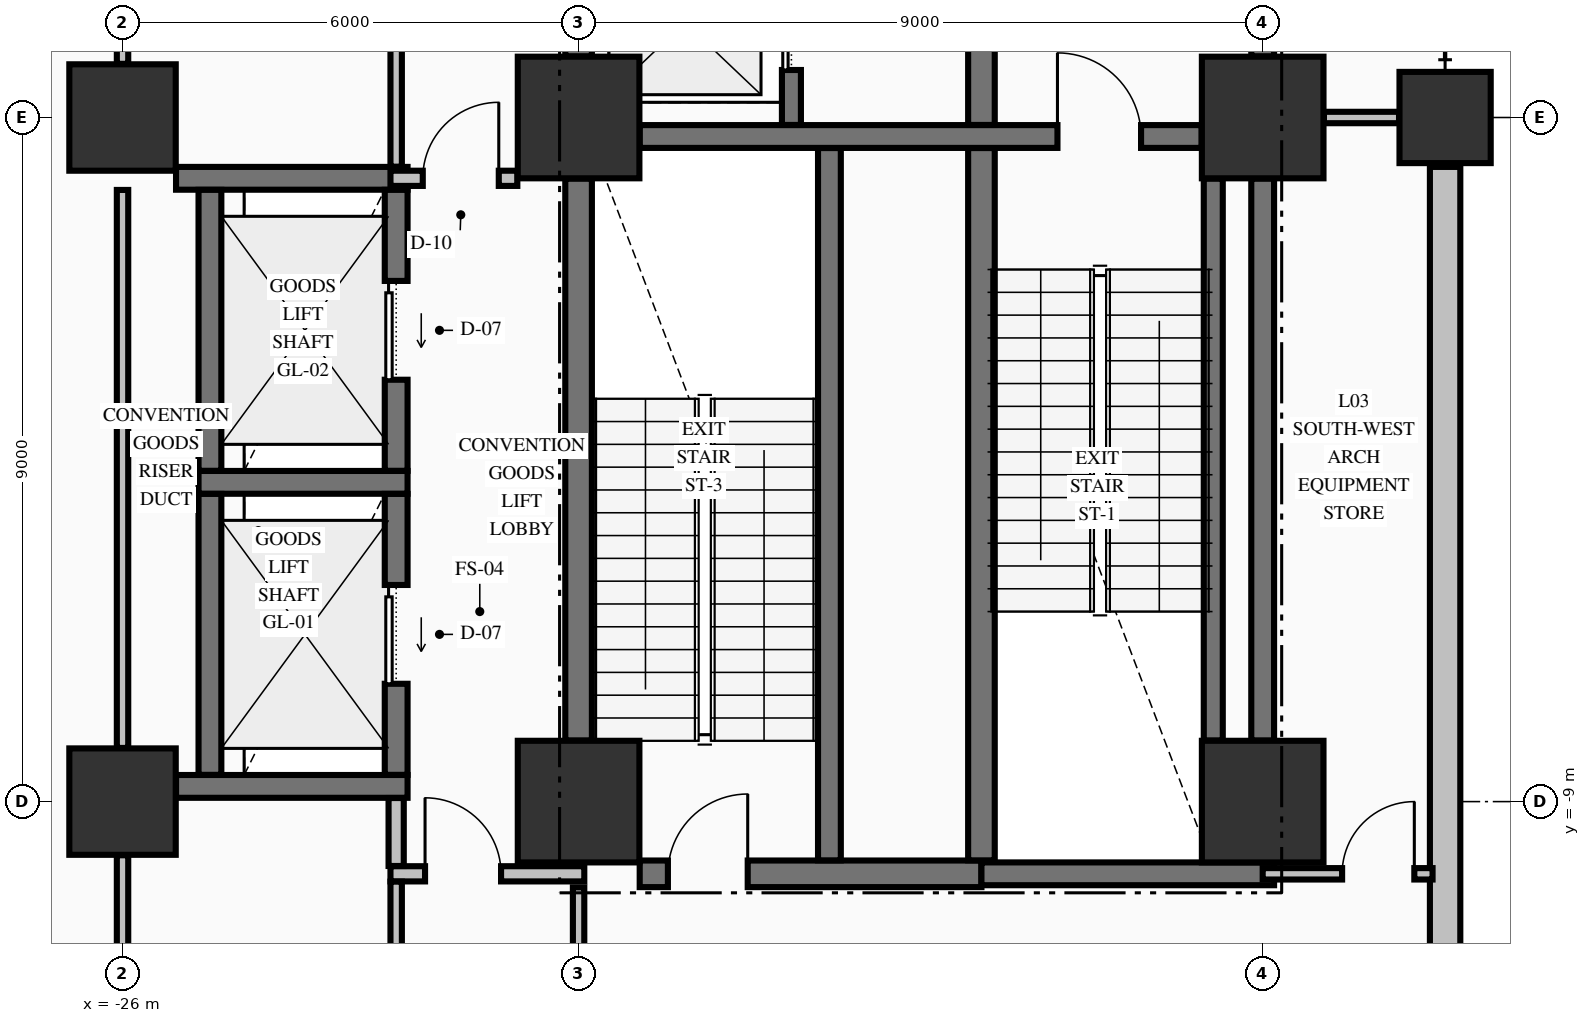
"""IFC4 building model, lengths in metres.
Left out: names, types, materials, properties, quantities, classifications, styles, units other than length and angle.
Written with IfcOpenShell. Run it as: python <this file> out.ifc"""

import sys

from ifc_helpers import new_model, si_unit, direction, frame, frame_2d, origin, origin_2d, place, context, subcontext, project, spatial, rectangle, extrude, element, fill, save


model = new_model("IFC4")
c1 = context("Model", 3, precision=1e-05, world=origin(), true_north=direction((0.0, 1.0)))
c2 = subcontext(c1, "Body", "Model", "MODEL_VIEW")
j1 = project(units=[si_unit("LENGTHUNIT", "METRE"), si_unit("PLANEANGLEUNIT", "RADIAN")], contexts=[c1])
p1 = place(None, origin())
s1 = spatial("IfcSite", under=j1, at=p1, CompositionType="ELEMENT")
p2 = place(p1, origin())
s2 = spatial("IfcBuilding", under=s1, at=p2, CompositionType="ELEMENT")
p3 = place(p2, frame((0.0, 0.0, 16.32)))
s3 = spatial("IfcBuildingStorey", under=s2, at=p3, CompositionType="ELEMENT", Elevation=16.32)
for number, where, z_axis, x_axis in (
    (1, (-26.0, -9.0, 0.0), (0.0, 0.0, 1.0), (1.0, 0.0, 0.0)),
    (2, (-26.0, 0.0, 0.0), (0.0, 0.0, 1.0), (1.0, 0.0, 0.0)),
):
    element("IfcColumn", number, at=place(p3, frame(where, z_axis=z_axis, x_axis=x_axis)), inside=s3, PredefinedType="COLUMN", context=c2, shape_type="SweptSolid", body=[
        extrude(rectangle(XDim=1.4, YDim=1.4, at=origin_2d()), origin(), (0.0, 0.0, 1.0), 4.99),
    ])
for number, where, z_axis, x_axis in (
    (3, (-20.0, -9.0, 0.0), (0.0, 0.0, 1.0), (1.0, 0.0, 0.0)),
    (4, (-20.0, 0.0, 0.0), (0.0, 0.0, 1.0), (1.0, 0.0, 0.0)),
    (5, (-11.0, -9.0, 0.0), (0.0, 0.0, 1.0), (1.0, 0.0, 0.0)),
    (6, (-11.0, 0.0, 0.0), (0.0, 0.0, 1.0), (1.0, 0.0, 0.0)),
):
    element("IfcColumn", number, at=place(p3, frame(where, z_axis=z_axis, x_axis=x_axis)), inside=s3, PredefinedType="COLUMN", context=c2, shape_type="SweptSolid", body=[
        extrude(rectangle(XDim=1.6, YDim=1.6, at=origin_2d()), origin(), (0.0, 0.0, 1.0), 4.99),
    ])
p4 = place(p3, frame((-8.6, 0.0, 0.0), z_axis=(0.0, 0.0, 1.0), x_axis=(1.0, 0.0, 0.0)))
e7 = element("IfcColumn", 7, at=p4, inside=s3, PredefinedType="COLUMN", context=c2, shape_type="SweptSolid", body=[
    extrude(rectangle(XDim=1.2, YDim=1.2, at=origin_2d()), origin(), (0.0, 0.0, 1.0), 4.99),
])
p5 = place(p3, frame((-8.6, -25.37, 0.0), z_axis=(0.0, 0.0, 1.0), x_axis=(0.0, 1.0, 0.0)))
e8 = element("IfcWall", 8, at=p5, inside=s3, PredefinedType="STANDARD", context=c2, shape_type="SweptSolid", body=[
    extrude(rectangle(XDim=24.72, YDim=0.4, at=frame_2d((12.36, 0.0))), origin(), (0.0, 0.0, 1.0), 2.582),
])
p6 = place(p3, frame((-19.196, -9.95, 0.0), z_axis=(0.0, 0.0, 1.0), x_axis=(1.0, 0.0, 0.0)))
e9 = element("IfcWall", 9, at=p6, inside=s3, PredefinedType="SHEAR", context=c2, shape_type="SweptSolid", body=[
    extrude(rectangle(XDim=4.496, YDim=0.35, at=frame_2d((2.248, 0.0))), origin(), (0.0, 0.0, 1.0), 4.99),
])
p7 = place(p6, frame((0.371, 0.0, 0.0)))
e10 = element("IfcOpeningElement", 10, at=p7, cuts=e9, PredefinedType="OPENING", context=c2, shape_type="SweptSolid", body=[
    extrude(rectangle(XDim=1.05, YDim=2.15, at=frame_2d((0.525, 1.075))), frame((0.0, 0.185, 0.0), z_axis=(0.0, -1.0, 0.0), x_axis=(1.0, 0.0, 0.0)), (0.0, 0.0, 1.0), 0.37),
])
p8 = place(p3, frame((-14.7, -9.95, 0.0), z_axis=(0.0, 0.0, 1.0), x_axis=(1.0, 0.0, 0.0)))
e11 = element("IfcWall", 11, at=p8, inside=s3, PredefinedType="SHEAR", context=c2, shape_type="SweptSolid", body=[
    extrude(rectangle(XDim=3.85, YDim=0.3, at=frame_2d((1.925, 0.0))), origin(), (0.0, 0.0, 1.0), 4.99),
])
p9 = place(p3, frame((-25.296, -8.8, 0.0), z_axis=(0.0, 0.0, 1.0), x_axis=(1.0, 0.0, 0.0)))
e12 = element("IfcWall", 12, at=p9, inside=s3, PredefinedType="SHEAR", context=c2, shape_type="SweptSolid", body=[
    extrude(rectangle(XDim=3.046, YDim=0.3, at=frame_2d((1.523, 0.0))), origin(), (0.0, 0.0, 1.0), 4.99),
])
p10 = place(p3, frame((-25.0, -4.8, 0.0), z_axis=(0.0, 0.0, 1.0), x_axis=(1.0, 0.0, 0.0)))
e13 = element("IfcWall", 13, at=p10, inside=s3, PredefinedType="SHEAR", context=c2, shape_type="SweptSolid", body=[
    extrude(rectangle(XDim=2.75, YDim=0.3, at=frame_2d((1.375, 0.0))), origin(), (0.0, 0.0, 1.0), 4.99),
])
p11 = place(p3, frame((-25.296, -0.8, 0.0), z_axis=(0.0, 0.0, 1.0), x_axis=(1.0, 0.0, 0.0)))
e14 = element("IfcWall", 14, at=p11, inside=s3, PredefinedType="SHEAR", context=c2, shape_type="SweptSolid", body=[
    extrude(rectangle(XDim=3.046, YDim=0.3, at=frame_2d((1.523, 0.0))), origin(), (0.0, 0.0, 1.0), 4.99),
])
p12 = place(p3, frame((-19.196, -0.25, 0.0), z_axis=(0.0, 0.0, 1.0), x_axis=(1.0, 0.0, 0.0)))
e15 = element("IfcWall", 15, at=p12, inside=s3, PredefinedType="SHEAR", context=c2, shape_type="SweptSolid", body=[
    extrude(rectangle(XDim=7.392, YDim=0.3, at=frame_2d((3.696, 0.0))), origin(), (0.0, 0.0, 1.0), 4.99),
])
p13 = place(p12, frame((5.496, 0.0, 0.0)))
e16 = element("IfcOpeningElement", 16, at=p13, cuts=e15, PredefinedType="OPENING", context=c2, shape_type="SweptSolid", body=[
    extrude(rectangle(XDim=1.1, YDim=2.15, at=frame_2d((0.55, 1.075))), frame((0.0, 0.16, 0.0), z_axis=(0.0, -1.0, 0.0), x_axis=(1.0, 0.0, 0.0)), (0.0, 0.0, 1.0), 0.32),
])
p14 = place(p3, frame((-22.475, -9.95, 0.0), z_axis=(0.0, 0.0, 1.0), x_axis=(1.0, 0.0, 0.0)))
e17 = element("IfcWall", 17, at=p14, inside=s3, PredefinedType="PARTITIONING", context=c2, shape_type="SweptSolid", body=[
    extrude(rectangle(XDim=2.55, YDim=0.2, at=frame_2d((1.275, 0.0))), origin(), (0.0, 0.0, 1.0), 4.99),
])
p15 = place(p14, frame((0.455, 0.0, 0.0)))
e18 = element("IfcOpeningElement", 18, at=p15, cuts=e17, PredefinedType="OPENING", context=c2, shape_type="SweptSolid", body=[
    extrude(rectangle(XDim=1.0, YDim=2.15, at=frame_2d((0.5, 1.075))), frame((0.0, 0.11, 0.0), z_axis=(0.0, -1.0, 0.0), x_axis=(1.0, 0.0, 0.0)), (0.0, 0.0, 1.0), 0.22),
])
p16 = place(p3, frame((-11.0, -9.95, 0.0), z_axis=(0.0, 0.0, 1.0), x_axis=(1.0, 0.0, 0.0)))
e19 = element("IfcWall", 19, at=p16, inside=s3, PredefinedType="PARTITIONING", context=c2, shape_type="SweptSolid", body=[
    extrude(rectangle(XDim=2.235, YDim=0.15, at=frame_2d((1.118, 0.0))), origin(), (0.0, 0.0, 1.0), 4.99),
])
p17 = place(p16, frame((1.045, 0.0, 0.0)))
e20 = element("IfcOpeningElement", 20, at=p17, cuts=e19, PredefinedType="OPENING", context=c2, shape_type="SweptSolid", body=[
    extrude(rectangle(XDim=0.95, YDim=2.15, at=frame_2d((0.475, 1.075))), frame((0.0, 0.085, 0.0), z_axis=(0.0, -1.0, 0.0), x_axis=(1.0, 0.0, 0.0)), (0.0, 0.0, 1.0), 0.17),
])
p18 = place(p3, frame((-22.475, -0.8, 0.0), z_axis=(0.0, 0.0, 1.0), x_axis=(1.0, 0.0, 0.0)))
e21 = element("IfcWall", 21, at=p18, inside=s3, PredefinedType="PARTITIONING", context=c2, shape_type="SweptSolid", body=[
    extrude(rectangle(XDim=1.669, YDim=0.2, at=frame_2d((0.834, 0.0))), origin(), (0.0, 0.0, 1.0), 4.99),
])
p19 = place(p18, frame((0.425, 0.0, 0.0)))
e22 = element("IfcOpeningElement", 22, at=p19, cuts=e21, PredefinedType="OPENING", context=c2, shape_type="SweptSolid", body=[
    extrude(rectangle(XDim=1.0, YDim=2.15, at=frame_2d((0.5, 1.075))), frame((0.0, 0.11, 0.0), z_axis=(0.0, -1.0, 0.0), x_axis=(1.0, 0.0, 0.0)), (0.0, 0.0, 1.0), 0.22),
])
p20 = place(p3, frame((-10.194, 0.0, 0.0), z_axis=(0.0, 0.0, 1.0), x_axis=(1.0, 0.0, 0.0)))
e23 = element("IfcWall", 23, at=p20, inside=s3, PredefinedType="PARTITIONING", context=c2, shape_type="SweptSolid", body=[
    extrude(rectangle(XDim=0.988, YDim=0.15, at=frame_2d((0.494, 0.0))), origin(), (0.0, 0.0, 1.0), 3.332),
])
for number, where, z_axis, x_axis in (
    (24, (-24.85, -8.648, 0.0), (0.0, 0.0, 1.0), (0.0, 1.0, 0.0)),
    (25, (-24.85, -4.648, 0.0), (0.0, 0.0, 1.0), (0.0, 1.0, 0.0)),
):
    element("IfcWall", number, at=place(p3, frame(where, z_axis=z_axis, x_axis=x_axis)), inside=s3, PredefinedType="SHEAR", context=c2, shape_type="SweptSolid", body=[
        extrude(rectangle(XDim=3.696, YDim=0.3, at=frame_2d((1.848, 0.0))), origin(), (0.0, 0.0, 1.0), 4.99),
    ])
p21 = place(p3, frame((-22.4, -8.648, 0.0), z_axis=(0.0, 0.0, 1.0), x_axis=(0.0, 1.0, 0.0)))
e26 = element("IfcWall", 26, at=p21, inside=s3, PredefinedType="SHEAR", context=c2, shape_type="SweptSolid", body=[
    extrude(rectangle(XDim=3.696, YDim=0.3, at=frame_2d((1.848, 0.0))), origin(), (0.0, 0.0, 1.0), 4.99),
])
p22 = place(p21, frame((1.198, 0.0, 0.0)))
e27 = element("IfcOpeningElement", 27, at=p22, cuts=e26, PredefinedType="OPENING", context=c2, shape_type="SweptSolid", body=[
    extrude(rectangle(XDim=1.3, YDim=2.3, at=frame_2d((0.65, 1.15))), frame((0.0, 0.16, 0.0), z_axis=(0.0, -1.0, 0.0), x_axis=(1.0, 0.0, 0.0)), (0.0, 0.0, 1.0), 0.32),
])
p23 = place(p3, frame((-22.4, -4.648, 0.0), z_axis=(0.0, 0.0, 1.0), x_axis=(0.0, 1.0, 0.0)))
e28 = element("IfcWall", 28, at=p23, inside=s3, PredefinedType="SHEAR", context=c2, shape_type="SweptSolid", body=[
    extrude(rectangle(XDim=3.696, YDim=0.3, at=frame_2d((1.848, 0.0))), origin(), (0.0, 0.0, 1.0), 4.99),
])
p24 = place(p23, frame((1.198, 0.0, 0.0)))
e29 = element("IfcOpeningElement", 29, at=p24, cuts=e28, PredefinedType="OPENING", context=c2, shape_type="SweptSolid", body=[
    extrude(rectangle(XDim=1.3, YDim=2.3, at=frame_2d((0.65, 1.15))), frame((0.0, 0.16, 0.0), z_axis=(0.0, -1.0, 0.0), x_axis=(1.0, 0.0, 0.0)), (0.0, 0.0, 1.0), 0.32),
])
p25 = place(p3, frame((-20.0, -8.196, 0.0), z_axis=(0.0, 0.0, 1.0), x_axis=(0.0, 1.0, 0.0)))
e30 = element("IfcWall", 30, at=p25, inside=s3, PredefinedType="SHEAR", context=c2, shape_type="SweptSolid", body=[
    extrude(rectangle(XDim=7.392, YDim=0.35, at=frame_2d((3.696, 0.0))), origin(), (0.0, 0.0, 1.0), 4.99),
])
p26 = place(p3, frame((-20.0, 0.804, 0.0), z_axis=(0.0, 0.0, 1.0), x_axis=(0.0, 1.0, 0.0)))
e31 = element("IfcWall", 31, at=p26, inside=s3, PredefinedType="SHEAR", context=c2, shape_type="SweptSolid", body=[
    extrude(rectangle(XDim=1.669, YDim=0.35, at=frame_2d((0.834, 0.0))), origin(), (0.0, 0.0, 1.0), 4.99),
])
p27 = place(p3, frame((-17.2, -0.098, 0.0), z_axis=(0.0, 0.0, 1.0), x_axis=(0.0, 1.0, 0.0)))
e32 = element("IfcWall", 32, at=p27, inside=s3, PredefinedType="SOLIDWALL", context=c2, shape_type="SweptSolid", body=[
    extrude(rectangle(XDim=2.571, YDim=0.25, at=frame_2d((1.285, 0.0))), origin(), (0.0, 0.0, 1.0), 4.99),
])
p28 = place(p27, frame((0.723, 0.0, 0.0)))
e33 = element("IfcOpeningElement", 33, at=p28, cuts=e32, PredefinedType="OPENING", context=c2, shape_type="SweptSolid", body=[
    extrude(rectangle(XDim=1.1, YDim=2.2, at=frame_2d((0.55, 1.1))), frame((0.0, 0.135, 0.0), z_axis=(0.0, -1.0, 0.0), x_axis=(1.0, 0.0, 0.0)), (0.0, 0.0, 1.0), 0.27),
])
p29 = place(p3, frame((-16.7, -9.773, 0.0), z_axis=(0.0, 0.0, 1.0), x_axis=(0.0, 1.0, 0.0)))
e34 = element("IfcWall", 34, at=p29, inside=s3, PredefinedType="SHEAR", context=c2, shape_type="SweptSolid", body=[
    extrude(rectangle(XDim=9.371, YDim=0.3, at=frame_2d((4.686, 0.0))), origin(), (0.0, 0.0, 1.0), 4.99),
])
p30 = place(p3, frame((-14.7, -9.773, 0.0), z_axis=(0.0, 0.0, 1.0), x_axis=(0.0, 1.0, 0.0)))
e35 = element("IfcWall", 35, at=p30, inside=s3, PredefinedType="SHEAR", context=c2, shape_type="SweptSolid", body=[
    extrude(rectangle(XDim=9.371, YDim=0.35, at=frame_2d((4.686, 0.0))), origin(), (0.0, 0.0, 1.0), 4.99),
])
p31 = place(p3, frame((-14.7, -0.098, 0.0), z_axis=(0.0, 0.0, 1.0), x_axis=(0.0, 1.0, 0.0)))
e36 = element("IfcWall", 36, at=p31, inside=s3, PredefinedType="SHEAR", context=c2, shape_type="SweptSolid", body=[
    extrude(rectangle(XDim=2.846, YDim=0.35, at=frame_2d((1.423, 0.0))), origin(), (0.0, 0.0, 1.0), 4.99),
])
p32 = place(p3, frame((-11.65, -8.196, 0.0), z_axis=(0.0, 0.0, 1.0), x_axis=(0.0, 1.0, 0.0)))
e37 = element("IfcWall", 37, at=p32, inside=s3, PredefinedType="SOLIDWALL", context=c2, shape_type="SweptSolid", body=[
    extrude(rectangle(XDim=7.392, YDim=0.25, at=frame_2d((3.696, 0.0))), origin(), (0.0, 0.0, 1.0), 4.99),
])
p33 = place(p3, frame((-11.0, -8.196, 0.0), z_axis=(0.0, 0.0, 1.0), x_axis=(0.0, 1.0, 0.0)))
e38 = element("IfcWall", 38, at=p33, inside=s3, PredefinedType="SHEAR", context=c2, shape_type="SweptSolid", body=[
    extrude(rectangle(XDim=7.392, YDim=0.3, at=frame_2d((3.696, 0.0))), origin(), (0.0, 0.0, 1.0), 4.99),
])
p34 = place(p3, frame((-11.0, 0.804, 0.0), z_axis=(0.0, 0.0, 1.0), x_axis=(0.0, 1.0, 0.0)))
e39 = element("IfcWall", 39, at=p34, inside=s3, PredefinedType="SHEAR", context=c2, shape_type="SweptSolid", body=[
    extrude(rectangle(XDim=1.944, YDim=0.3, at=frame_2d((0.972, 0.0))), origin(), (0.0, 0.0, 1.0), 4.99),
])
p35 = place(p34, frame((0.296, 0.0, 0.0)))
e40 = element("IfcOpeningElement", 40, at=p35, cuts=e39, PredefinedType="OPENING", context=c2, shape_type="SweptSolid", body=[
    extrude(rectangle(XDim=1.1, YDim=2.15, at=frame_2d((0.55, 1.075))), frame((0.0, 0.16, 0.0), z_axis=(0.0, -1.0, 0.0), x_axis=(1.0, 0.0, 0.0)), (0.0, 0.0, 1.0), 0.32),
])
p36 = place(p3, frame((-26.0, -15.294, 0.0), z_axis=(0.0, 0.0, 1.0), x_axis=(0.0, 1.0, 0.0)))
e41 = element("IfcWall", 41, at=p36, inside=s3, PredefinedType="PARTITIONING", context=c2, shape_type="SweptSolid", body=[
    extrude(rectangle(XDim=5.588, YDim=0.15, at=frame_2d((2.794, 0.0))), origin(), (0.0, 0.0, 1.0), 3.332),
])
p37 = place(p3, frame((-26.0, -8.294, 0.0), z_axis=(0.0, 0.0, 1.0), x_axis=(0.0, 1.0, 0.0)))
e42 = element("IfcWall", 42, at=p37, inside=s3, PredefinedType="PARTITIONING", context=c2, shape_type="SweptSolid", body=[
    extrude(rectangle(XDim=7.341, YDim=0.15, at=frame_2d((3.67, 0.0))), origin(), (0.0, 0.0, 1.0), 3.332),
])
p38 = place(p3, frame((-26.0, 0.706, 0.0), z_axis=(0.0, 0.0, 1.0), x_axis=(0.0, 1.0, 0.0)))
e43 = element("IfcWall", 43, at=p38, inside=s3, PredefinedType="PARTITIONING", context=c2, shape_type="SweptSolid", body=[
    extrude(rectangle(XDim=7.588, YDim=0.15, at=frame_2d((3.794, 0.0))), origin(), (0.0, 0.0, 1.0), 3.332),
])
p39 = place(p3, frame((-22.4, -16.122, 0.0), z_axis=(0.0, 0.0, 1.0), x_axis=(0.0, 1.0, 0.0)))
e44 = element("IfcWall", 44, at=p39, inside=s3, PredefinedType="PARTITIONING", context=c2, shape_type="SweptSolid", body=[
    extrude(rectangle(XDim=6.069, YDim=0.15, at=frame_2d((3.035, 0.0))), origin(), (0.0, 0.0, 1.0), 4.99),
])
p40 = place(p3, frame((-22.4, -9.847, 0.0), z_axis=(0.0, 0.0, 1.0), x_axis=(0.0, 1.0, 0.0)))
e45 = element("IfcWall", 45, at=p40, inside=s3, PredefinedType="PARTITIONING", context=c2, shape_type="SweptSolid", body=[
    extrude(rectangle(XDim=0.894, YDim=0.2, at=frame_2d((0.447, 0.0))), origin(), (0.0, 0.0, 1.0), 4.99),
])
p41 = place(p3, frame((-22.4, -0.647, 0.0), z_axis=(0.0, 0.0, 1.0), x_axis=(0.0, 1.0, 0.0)))
e46 = element("IfcWall", 46, at=p41, inside=s3, PredefinedType="PARTITIONING", context=c2, shape_type="SweptSolid", body=[
    extrude(rectangle(XDim=16.569, YDim=0.15, at=frame_2d((8.285, 0.0))), origin(), (0.0, 0.0, 1.0), 4.99),
])
p42 = place(p41, frame((6.597, 0.0, 0.0)))
e47 = element("IfcOpeningElement", 47, at=p42, cuts=e46, PredefinedType="OPENING", context=c2, shape_type="SweptSolid", body=[
    extrude(rectangle(XDim=1.1, YDim=2.15, at=frame_2d((0.55, 1.075))), frame((0.0, 0.085, 0.0), z_axis=(0.0, -1.0, 0.0), x_axis=(1.0, 0.0, 0.0)), (0.0, 0.0, 1.0), 0.17),
])
p43 = place(p3, frame((-20.0, -15.194, 0.0), z_axis=(0.0, 0.0, 1.0), x_axis=(0.0, 1.0, 0.0)))
e48 = element("IfcWall", 48, at=p43, inside=s3, PredefinedType="PARTITIONING", context=c2, shape_type="SweptSolid", body=[
    extrude(rectangle(XDim=5.066, YDim=0.15, at=frame_2d((2.533, 0.0))), origin(), (0.0, 0.0, 1.0), 4.99),
])
p44 = place(p43, frame((1.569, 0.0, 0.0)))
e49 = element("IfcOpeningElement", 49, at=p44, cuts=e48, PredefinedType="OPENING", context=c2, shape_type="SweptSolid", body=[
    extrude(rectangle(XDim=1.05, YDim=2.15, at=frame_2d((0.525, 1.075))), frame((0.0, 0.085, 0.0), z_axis=(0.0, -1.0, 0.0), x_axis=(1.0, 0.0, 0.0)), (0.0, 0.0, 1.0), 0.17),
])
p45 = place(p13, origin())
e50 = element("IfcDoor", 50, at=p45, inside=s3, OperationType="SINGLE_SWING_LEFT", PredefinedType="DOOR", context=c2, shape_type="SweptSolid", body=[
    extrude(rectangle(XDim=1.1, YDim=2.15, at=frame_2d((0.55, 1.075))), frame((0.0, 0.025, 0.0), z_axis=(0.0, -1.0, 0.0), x_axis=(1.0, 0.0, 0.0)), (0.0, 0.0, 1.0), 0.05),
])
fill(e16, e50)
p46 = place(p7, origin())
e51 = element("IfcDoor", 51, at=p46, inside=s3, OperationType="SINGLE_SWING_RIGHT", PredefinedType="DOOR", context=c2, shape_type="SweptSolid", body=[
    extrude(rectangle(XDim=1.05, YDim=2.15, at=frame_2d((0.525, 1.075))), frame((0.0, 0.025, 0.0), z_axis=(0.0, -1.0, 0.0), x_axis=(1.0, 0.0, 0.0)), (0.0, 0.0, 1.0), 0.05),
])
fill(e10, e51)
p47 = place(p28, origin())
e52 = element("IfcDoor", 52, at=p47, inside=s3, OperationType="SLIDING_TO_LEFT", PredefinedType="DOOR", context=c2, shape_type="SweptSolid", body=[
    extrude(rectangle(XDim=1.1, YDim=2.2, at=frame_2d((0.55, 1.1))), frame((0.0, 0.025, 0.0), z_axis=(0.0, -1.0, 0.0), x_axis=(1.0, 0.0, 0.0)), (0.0, 0.0, 1.0), 0.05),
])
fill(e33, e52)
p48 = place(p22, origin())
e53 = element("IfcDoor", 53, at=p48, inside=s3, OperationType="SLIDING_TO_LEFT", PredefinedType="DOOR", context=c2, shape_type="SweptSolid", body=[
    extrude(rectangle(XDim=1.3, YDim=2.3, at=frame_2d((0.65, 1.15))), frame((0.0, 0.025, 0.0), z_axis=(0.0, -1.0, 0.0), x_axis=(1.0, 0.0, 0.0)), (0.0, 0.0, 1.0), 0.05),
])
fill(e27, e53)
p49 = place(p24, origin())
e54 = element("IfcDoor", 54, at=p49, inside=s3, OperationType="SLIDING_TO_LEFT", PredefinedType="DOOR", context=c2, shape_type="SweptSolid", body=[
    extrude(rectangle(XDim=1.3, YDim=2.3, at=frame_2d((0.65, 1.15))), frame((0.0, 0.025, 0.0), z_axis=(0.0, -1.0, 0.0), x_axis=(1.0, 0.0, 0.0)), (0.0, 0.0, 1.0), 0.05),
])
fill(e29, e54)
p50 = place(p19, origin())
e55 = element("IfcDoor", 55, at=p50, inside=s3, OperationType="SINGLE_SWING_RIGHT", PredefinedType="DOOR", context=c2, shape_type="SweptSolid", body=[
    extrude(rectangle(XDim=1.0, YDim=2.15, at=frame_2d((0.5, 1.075))), frame((0.0, 0.025, 0.0), z_axis=(0.0, -1.0, 0.0), x_axis=(1.0, 0.0, 0.0)), (0.0, 0.0, 1.0), 0.05),
])
fill(e22, e55)
p51 = place(p17, origin())
e56 = element("IfcDoor", 56, at=p51, inside=s3, OperationType="SINGLE_SWING_RIGHT", PredefinedType="DOOR", context=c2, shape_type="SweptSolid", body=[
    extrude(rectangle(XDim=0.95, YDim=2.15, at=frame_2d((0.475, 1.075))), frame((0.0, 0.025, 0.0), z_axis=(0.0, -1.0, 0.0), x_axis=(1.0, 0.0, 0.0)), (0.0, 0.0, 1.0), 0.05),
])
fill(e20, e56)
p52 = place(p15, origin())
e57 = element("IfcDoor", 57, at=p52, inside=s3, OperationType="SINGLE_SWING_LEFT", PredefinedType="DOOR", context=c2, shape_type="SweptSolid", body=[
    extrude(rectangle(XDim=1.0, YDim=2.15, at=frame_2d((0.5, 1.075))), frame((0.0, 0.025, 0.0), z_axis=(0.0, -1.0, 0.0), x_axis=(1.0, 0.0, 0.0)), (0.0, 0.0, 1.0), 0.05),
])
fill(e18, e57)
save(model, sys.argv[1])
